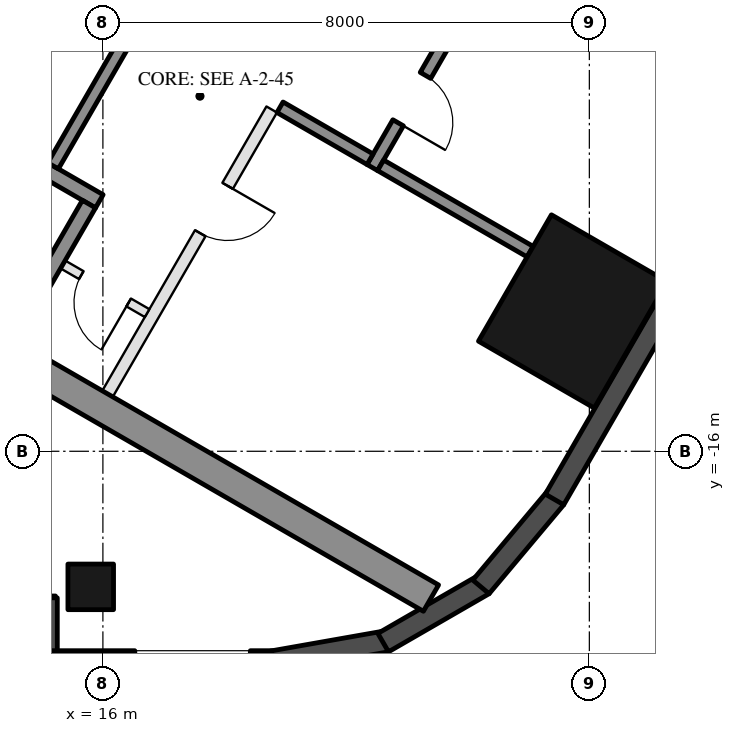
"""IFC4 building model, lengths in metres.
Left out: names, types, materials, properties, quantities, classifications, styles, units other than length and angle.
Written with IfcOpenShell. Run it as: python <this file> out.ifc"""

import sys

from ifc_helpers import new_model, si_unit, direction, frame, frame_2d, origin, origin_2d, place, context, subcontext, project, spatial, rectangle, hollow_rectangle, extrude, element, fill, save


model = new_model("IFC4")
c1 = context("Model", 3, precision=1e-05, world=origin(), true_north=direction((0.0, 1.0)))
c2 = subcontext(c1, "Body", "Model", "MODEL_VIEW")
j1 = project(units=[si_unit("LENGTHUNIT", "METRE"), si_unit("PLANEANGLEUNIT", "RADIAN")], contexts=[c1])
p1 = place(None, origin())
s1 = spatial("IfcSite", under=j1, at=p1, CompositionType="ELEMENT")
p2 = place(p1, origin())
s2 = spatial("IfcBuilding", under=s1, at=p2, CompositionType="ELEMENT")
p3 = place(p2, frame((0.0, 0.0, 194.7)))
s3 = spatial("IfcBuildingStorey", under=s2, at=p3, CompositionType="ELEMENT", Elevation=194.7)
p4 = place(p3, frame((15.8, -18.23, 0.0), z_axis=(0.0, 0.0, 1.0), x_axis=(-1.0, 0.0, 0.0)))
e1 = element("IfcColumn", 1, at=p4, inside=s3, PredefinedType="COLUMN", context=c2, shape_type="SweptSolid", body=[
    extrude(hollow_rectangle(XDim=0.75, YDim=0.75, WallThickness=0.035, at=origin_2d()), origin(), (0.0, 0.0, 1.0), 3.7),
])
p5 = place(p3, frame((23.729, -13.7, 0.0), z_axis=(0.0, 0.0, 1.0), x_axis=(0.5, 0.866025403784, 0.0)))
e2 = element("IfcColumn", 2, at=p5, inside=s3, PredefinedType="COLUMN", context=c2, shape_type="SweptSolid", body=[
    extrude(hollow_rectangle(XDim=2.4, YDim=2.2, WallThickness=0.06, at=origin_2d()), origin(), (0.0, 0.0, 1.0), 3.7),
])
p6 = place(p3, frame((8.48, -18.555, 0.0), z_axis=(0.0, 0.0, 1.0), x_axis=(1.0, 0.0, 0.0)))
e3 = element("IfcWall", 3, at=p6, inside=s3, PredefinedType="SOLIDWALL", context=c2, shape_type="SweptSolid", body=[
    extrude(rectangle(XDim=6.74, YDim=0.35, at=frame_2d((3.37, 0.0))), origin(), (0.0, 0.0, 1.0), 3.55),
])
p7 = place(p6, frame((0.32, 0.0, 0.0)))
e4 = element("IfcOpeningElement", 4, at=p7, cuts=e3, PredefinedType="OPENING", context=c2, shape_type="SweptSolid", body=[
    extrude(rectangle(XDim=2.4, YDim=2.4, at=frame_2d((1.2, 1.2))), frame((0.0, 0.185, 0.0), z_axis=(0.0, -1.0, 0.0), x_axis=(1.0, 0.0, 0.0)), (0.0, 0.0, 1.0), 0.37),
])
p8 = place(p6, frame((3.02, 0.0, 0.3)))
e5 = element("IfcOpeningElement", 5, at=p8, cuts=e3, PredefinedType="OPENING", context=c2, shape_type="SweptSolid", body=[
    extrude(rectangle(XDim=2.9, YDim=2.65, at=frame_2d((1.45, 1.325))), frame((0.0, 0.185, 0.0), z_axis=(0.0, -1.0, 0.0), x_axis=(1.0, 0.0, 0.0)), (0.0, 0.0, 1.0), 0.37),
])
p9 = place(p3, frame((15.075, -18.41, 0.0), z_axis=(0.0, 0.0, 1.0), x_axis=(0.0, -1.0, 0.0)))
e6 = element("IfcWall", 6, at=p9, inside=s3, PredefinedType="SOLIDWALL", context=c2, shape_type="SweptSolid", body=[
    extrude(rectangle(XDim=1.22, YDim=0.35, at=frame_2d((0.61, 0.0))), origin(), (0.0, 0.0, 1.0), 3.55),
])
p10 = place(p3, frame((14.9, -19.455, 0.0), z_axis=(0.0, 0.0, 1.0), x_axis=(1.0, 0.0, 0.0)))
e7 = element("IfcWall", 7, at=p10, inside=s3, PredefinedType="SOLIDWALL", context=c2, shape_type="SweptSolid", body=[
    extrude(rectangle(XDim=3.916, YDim=0.35, at=frame_2d((1.958, 0.0))), origin(), (0.0, 0.0, 1.0), 3.55),
])
p11 = place(p10, frame((1.625, 0.0, 0.3)))
e8 = element("IfcOpeningElement", 8, at=p11, cuts=e7, PredefinedType="OPENING", context=c2, shape_type="SweptSolid", body=[
    extrude(rectangle(XDim=1.9, YDim=2.65, at=frame_2d((0.95, 1.325))), frame((0.0, 0.185, 0.0), z_axis=(0.0, -1.0, 0.0), x_axis=(1.0, 0.0, 0.0)), (0.0, 0.0, 1.0), 0.37),
])
p12 = place(p3, frame((18.785, -19.458, 0.0), z_axis=(0.0, 0.0, 1.0), x_axis=(0.984798995425, 0.173697837091, 0.0)))
e9 = element("IfcWall", 9, at=p12, inside=s3, PredefinedType="SOLIDWALL", context=c2, shape_type="SweptSolid", body=[
    extrude(rectangle(XDim=1.91, YDim=0.35, at=frame_2d((0.955, 0.0))), origin(), (0.0, 0.0, 1.0), 3.55),
])
for number, where, z_axis, x_axis in (
    (10, (20.61, -19.147, 0.0), (0.0, 0.0, 1.0), (0.866, 0.5, 0.0)),
    (11, (22.217, -18.231, 0.0), (0.0, 0.0, 1.0), (0.643, 0.766, 0.0)),
):
    element("IfcWall", number, at=place(p3, frame(where, z_axis=z_axis, x_axis=x_axis)), inside=s3, PredefinedType="SOLIDWALL", context=c2, shape_type="SweptSolid", body=[
        extrude(rectangle(XDim=1.91, YDim=0.35, at=frame_2d((0.955, 0.0))), origin(), (0.0, 0.0, 1.0), 3.55),
    ])
p13 = place(p3, frame((23.427, -16.792, 0.0), z_axis=(0.0, 0.0, 1.0), x_axis=(0.500018773155, 0.866014564827, 0.0)))
e12 = element("IfcWall", 12, at=p13, inside=s3, PredefinedType="SOLIDWALL", context=c2, shape_type="SweptSolid", body=[
    extrude(rectangle(XDim=5.658, YDim=0.35, at=frame_2d((2.829, 0.0))), origin(), (0.0, 0.0, 1.0), 3.55),
])
for number, where, z_axis, x_axis in (
    (13, (8.547, -10.997, 0.0), (0.0, 0.0, 1.0), (0.866, -0.5, 0.0)),
    (14, (13.797, -1.903, 0.0), (0.0, 0.0, 1.0), (0.866, -0.5, 0.0)),
):
    element("IfcWall", number, at=place(p3, frame(where, z_axis=z_axis, x_axis=x_axis)), inside=s3, PredefinedType="SHEAR", context=c2, shape_type="SweptSolid", body=[
        extrude(rectangle(XDim=14.837, YDim=0.5, at=frame_2d((7.418, 0.0))), origin(), (0.0, 0.0, 1.0), 3.5),
    ])
p14 = place(p3, frame((10.356, -8.664, 0.0), z_axis=(0.0, 0.0, 1.0), x_axis=(0.866028629588, -0.499994412703, 0.0)))
e15 = element("IfcWall", 15, at=p14, inside=s3, PredefinedType="SHEAR", context=c2, shape_type="SweptSolid", body=[
    extrude(rectangle(XDim=6.45, YDim=0.25, at=frame_2d((3.225, 0.0))), origin(), (0.0, 0.0, 1.0), 3.5),
])
p15 = place(p14, frame((0.3, 0.0, 0.0)))
e16 = element("IfcOpeningElement", 16, at=p15, cuts=e15, PredefinedType="OPENING", context=c2, shape_type="SweptSolid", body=[
    extrude(rectangle(XDim=1.0, YDim=2.1, at=frame_2d((0.5, 1.05))), frame((0.0, 0.135, 0.0), z_axis=(0.0, -1.0, 0.0), x_axis=(1.0, 0.0, 0.0)), (0.0, 0.0, 1.0), 0.27),
])
p16 = place(p3, frame((14.496, -14.143, 0.0), z_axis=(0.0, 0.0, 1.0), x_axis=(0.500062241894, 0.865989465428, 0.0)))
e17 = element("IfcWall", 17, at=p16, inside=s3, PredefinedType="SHEAR", context=c2, shape_type="SweptSolid", body=[
    extrude(rectangle(XDim=2.55, YDim=0.25, at=frame_2d((1.275, 0.0))), origin(), (0.0, 0.0, 1.0), 3.5),
])
p17 = place(p3, frame((15.181, -11.305, 0.0), z_axis=(0.0, 0.0, 1.0), x_axis=(0.49994636267, 0.866056369097, 0.0)))
e18 = element("IfcWall", 18, at=p17, inside=s3, PredefinedType="SHEAR", context=c2, shape_type="SweptSolid", body=[
    extrude(rectangle(XDim=2.8, YDim=0.2, at=frame_2d((1.4, 0.0))), origin(), (0.0, 0.0, 1.0), 3.5),
])
p18 = place(p3, frame((20.43, -11.333, 0.0), z_axis=(0.0, 0.0, 1.0), x_axis=(0.500001309137, 0.866024647952, 0.0)))
e19 = element("IfcWall", 19, at=p18, inside=s3, PredefinedType="SHEAR", context=c2, shape_type="SweptSolid", body=[
    extrude(rectangle(XDim=2.4, YDim=0.2, at=frame_2d((1.2, 0.0))), origin(), (0.0, 0.0, 1.0), 3.5),
])
p19 = place(p18, frame((0.85, 0.0, 0.0)))
e20 = element("IfcOpeningElement", 20, at=p19, cuts=e19, PredefinedType="OPENING", context=c2, shape_type="SweptSolid", body=[
    extrude(rectangle(XDim=0.9, YDim=2.1, at=frame_2d((0.45, 1.05))), frame((0.0, 0.11, 0.0), z_axis=(0.0, -1.0, 0.0), x_axis=(1.0, 0.0, 0.0)), (0.0, 0.0, 1.0), 0.22),
])
p20 = place(p3, frame((18.913, -10.342, 0.0), z_axis=(0.0, 0.0, 1.0), x_axis=(0.866038183914, -0.499977863513, 0.0)))
e21 = element("IfcWall", 21, at=p20, inside=s3, PredefinedType="SHEAR", context=c2, shape_type="SweptSolid", body=[
    extrude(rectangle(XDim=1.71, YDim=0.2, at=frame_2d((0.855, 0.0))), origin(), (0.0, 0.0, 1.0), 3.5),
])
p21 = place(p3, frame((20.567, -11.297, 0.0), z_axis=(0.0, 0.0, 1.0), x_axis=(0.866055327414, -0.49994816717, 0.0)))
e22 = element("IfcWall", 22, at=p21, inside=s3, PredefinedType="SHEAR", context=c2, shape_type="SweptSolid", body=[
    extrude(rectangle(XDim=2.84, YDim=0.2, at=frame_2d((1.42, 0.0))), origin(), (0.0, 0.0, 1.0), 3.5),
])
p22 = place(p3, frame((16.076, -15.055, 0.0), z_axis=(0.0, 0.0, 1.0), x_axis=(0.499995103361, 0.866028230842, 0.0)))
e23 = element("IfcWall", 23, at=p22, inside=s3, PredefinedType="PARTITIONING", context=c2, shape_type="SweptSolid", body=[
    extrude(rectangle(XDim=5.4, YDim=0.2, at=frame_2d((2.7, 0.0))), origin(), (0.0, 0.0, 1.0), 3.5),
])
p23 = place(p22, frame((3.05, 0.0, 0.0)))
e24 = element("IfcOpeningElement", 24, at=p23, cuts=e23, PredefinedType="OPENING", context=c2, shape_type="SweptSolid", body=[
    extrude(rectangle(XDim=0.9, YDim=2.1, at=frame_2d((0.45, 1.05))), frame((0.0, 0.11, 0.0), z_axis=(0.0, -1.0, 0.0), x_axis=(1.0, 0.0, 0.0)), (0.0, 0.0, 1.0), 0.22),
])
p24 = place(p3, frame((15.342, -12.928, 0.0), z_axis=(0.0, 0.0, 1.0), x_axis=(0.865989903783, -0.500061482766, 0.0)))
e25 = element("IfcWall", 25, at=p24, inside=s3, PredefinedType="PARTITIONING", context=c2, shape_type="SweptSolid", body=[
    extrude(rectangle(XDim=1.6, YDim=0.15, at=frame_2d((0.8, 0.0))), origin(), (0.0, 0.0, 1.0), 3.5),
])
p25 = place(p24, frame((0.35, 0.0, 0.0)))
e26 = element("IfcOpeningElement", 26, at=p25, cuts=e25, PredefinedType="OPENING", context=c2, shape_type="SweptSolid", body=[
    extrude(rectangle(XDim=0.9, YDim=2.1, at=frame_2d((0.45, 1.05))), frame((0.0, 0.085, 0.0), z_axis=(0.0, -1.0, 0.0), x_axis=(1.0, 0.0, 0.0)), (0.0, 0.0, 1.0), 0.17),
])
p26 = place(p25, frame((0.9, 0.0, 0.0), z_axis=(0.0, 0.0, 1.0), x_axis=(-1.0, 0.0, 0.0)))
e27 = element("IfcDoor", 27, at=p26, inside=s3, OperationType="SINGLE_SWING_LEFT", PredefinedType="DOOR", context=c2, shape_type="SweptSolid", body=[
    extrude(rectangle(XDim=0.9, YDim=2.1, at=frame_2d((0.45, 1.05))), frame((0.0, 0.025, 0.0), z_axis=(0.0, -1.0, 0.0), x_axis=(1.0, 0.0, 0.0)), (0.0, 0.0, 1.0), 0.05),
])
fill(e26, e27)
p27 = place(p19, frame((0.9, 0.0, 0.0), z_axis=(0.0, 0.0, 1.0), x_axis=(-1.0, 0.0, 0.0)))
e28 = element("IfcDoor", 28, at=p27, inside=s3, OperationType="SINGLE_SWING_RIGHT", PredefinedType="DOOR", context=c2, shape_type="SweptSolid", body=[
    extrude(rectangle(XDim=0.9, YDim=2.1, at=frame_2d((0.45, 1.05))), frame((0.0, 0.025, 0.0), z_axis=(0.0, -1.0, 0.0), x_axis=(1.0, 0.0, 0.0)), (0.0, 0.0, 1.0), 0.05),
])
fill(e20, e28)
p28 = place(p23, frame((0.9, 0.0, 0.0), z_axis=(0.0, 0.0, 1.0), x_axis=(-1.0, 0.0, 0.0)))
e29 = element("IfcDoor", 29, at=p28, inside=s3, OperationType="SINGLE_SWING_LEFT", PredefinedType="DOOR", context=c2, shape_type="SweptSolid", body=[
    extrude(rectangle(XDim=0.9, YDim=2.1, at=frame_2d((0.45, 1.05))), frame((0.0, 0.025, 0.0), z_axis=(0.0, -1.0, 0.0), x_axis=(1.0, 0.0, 0.0)), (0.0, 0.0, 1.0), 0.05),
])
fill(e24, e29)
save(model, sys.argv[1])
